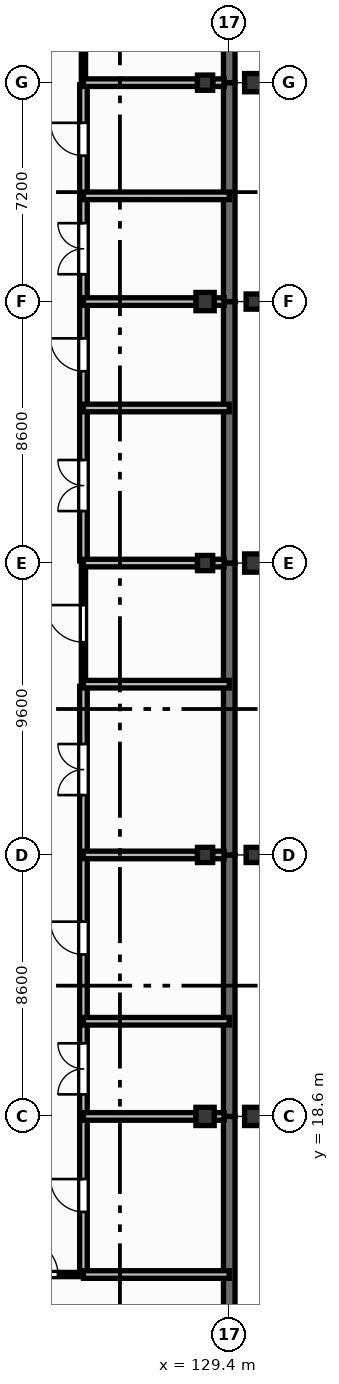
"""IFC4 building model, lengths in metres.
Left out: names, types, materials, properties, quantities, classifications, styles, units other than length and angle.
Written with IfcOpenShell. Run it as: python <this file> out.ifc"""

import sys

from ifc_helpers import new_model, si_unit, direction, frame, frame_2d, origin, origin_2d, place, context, subcontext, project, spatial, rectangle, extrude, element, fill, save


model = new_model("IFC4")
c1 = context("Model", 3, precision=1e-05, world=origin(), true_north=direction((0.0, 1.0)))
c2 = subcontext(c1, "Body", "Model", "MODEL_VIEW")
j1 = project(units=[si_unit("LENGTHUNIT", "METRE"), si_unit("PLANEANGLEUNIT", "RADIAN")], contexts=[c1])
p1 = place(None, origin())
s1 = spatial("IfcSite", under=j1, at=p1, CompositionType="ELEMENT")
p2 = place(p1, origin())
s2 = spatial("IfcBuilding", under=s1, at=p2, CompositionType="ELEMENT")
p3 = place(p2, origin())
s3 = spatial("IfcBuildingStorey", under=s2, at=p3, CompositionType="ELEMENT", Elevation=0.0)
p4 = place(p3, frame((128.6, 18.6, 0.0), z_axis=(0.0, 0.0, 1.0), x_axis=(1.0, 0.0, 0.0)))
e1 = element("IfcColumn", 1, at=p4, inside=s3, PredefinedType="COLUMN", context=c2, shape_type="SweptSolid", body=[
    extrude(rectangle(XDim=0.6, YDim=0.6, at=origin_2d()), origin(), (0.0, 0.0, 1.0), 4.2),
])
for number, where, z_axis, x_axis in (
    (2, (128.6, 27.2, 0.0), (0.0, 0.0, 1.0), (1.0, 0.0, 0.0)),
    (3, (128.6, 36.8, 0.0), (0.0, 0.0, 1.0), (1.0, 0.0, 0.0)),
):
    element("IfcColumn", number, at=place(p3, frame(where, z_axis=z_axis, x_axis=x_axis)), inside=s3, PredefinedType="COLUMN", context=c2, shape_type="SweptSolid", body=[
        extrude(rectangle(XDim=0.5, YDim=0.5, at=origin_2d()), origin(), (0.0, 0.0, 1.0), 4.2),
    ])
p5 = place(p3, frame((128.6, 45.4, 0.0), z_axis=(0.0, 0.0, 1.0), x_axis=(1.0, 0.0, 0.0)))
e4 = element("IfcColumn", 4, at=p5, inside=s3, PredefinedType="COLUMN", context=c2, shape_type="SweptSolid", body=[
    extrude(rectangle(XDim=0.6, YDim=0.6, at=origin_2d()), origin(), (0.0, 0.0, 1.0), 4.2),
])
p6 = place(p3, frame((128.6, 52.6, 0.0), z_axis=(0.0, 0.0, 1.0), x_axis=(1.0, 0.0, 0.0)))
e5 = element("IfcColumn", 5, at=p6, inside=s3, PredefinedType="COLUMN", context=c2, shape_type="SweptSolid", body=[
    extrude(rectangle(XDim=0.5, YDim=0.5, at=origin_2d()), origin(), (0.0, 0.0, 1.0), 4.2),
])
p7 = place(p3, frame((130.2, 18.6, -0.4), z_axis=(0.0, 0.0, 1.0), x_axis=(1.0, 0.0, 0.0)))
e6 = element("IfcColumn", 6, at=p7, inside=s3, PredefinedType="COLUMN", context=c2, shape_type="SweptSolid", body=[
    extrude(rectangle(XDim=0.6, YDim=0.6, at=origin_2d()), origin(), (0.0, 0.0, 1.0), 4.5),
])
p8 = place(p3, frame((130.2, 27.2, -0.4), z_axis=(0.0, 0.0, 1.0), x_axis=(1.0, 0.0, 0.0)))
e7 = element("IfcColumn", 7, at=p8, inside=s3, PredefinedType="COLUMN", context=c2, shape_type="SweptSolid", body=[
    extrude(rectangle(XDim=0.5, YDim=0.5, at=origin_2d()), origin(), (0.0, 0.0, 1.0), 4.5),
])
p9 = place(p3, frame((130.2, 36.8, -0.4), z_axis=(0.0, 0.0, 1.0), x_axis=(1.0, 0.0, 0.0)))
e8 = element("IfcColumn", 8, at=p9, inside=s3, PredefinedType="COLUMN", context=c2, shape_type="SweptSolid", body=[
    extrude(rectangle(XDim=0.6, YDim=0.6, at=origin_2d()), origin(), (0.0, 0.0, 1.0), 4.5),
])
p10 = place(p3, frame((130.2, 45.4, -0.4), z_axis=(0.0, 0.0, 1.0), x_axis=(1.0, 0.0, 0.0)))
e9 = element("IfcColumn", 9, at=p10, inside=s3, PredefinedType="COLUMN", context=c2, shape_type="SweptSolid", body=[
    extrude(rectangle(XDim=0.5, YDim=0.5, at=origin_2d()), origin(), (0.0, 0.0, 1.0), 4.5),
])
p11 = place(p3, frame((130.2, 52.6, -0.4), z_axis=(0.0, 0.0, 1.0), x_axis=(1.0, 0.0, 0.0)))
e10 = element("IfcColumn", 10, at=p11, inside=s3, PredefinedType="COLUMN", context=c2, shape_type="SweptSolid", body=[
    extrude(rectangle(XDim=0.6, YDim=0.6, at=origin_2d()), origin(), (0.0, 0.0, 1.0), 4.5),
])
p12 = place(p3, frame((129.395, 11.4, 0.0), z_axis=(0.0, 0.0, 1.0), x_axis=(0.0, 1.0, 0.0)))
e11 = element("IfcWall", 11, at=p12, inside=s3, PredefinedType="USERDEFINED", context=c2, shape_type="SweptSolid", body=[
    extrude(rectangle(XDim=7.2, YDim=0.38, at=frame_2d((3.6, 0.0))), origin(), (0.0, 0.0, 1.0), 4.2),
])
p13 = place(p3, frame((129.395, 18.6, 0.0), z_axis=(0.0, 0.0, 1.0), x_axis=(0.0, 1.0, 0.0)))
e12 = element("IfcWall", 12, at=p13, inside=s3, PredefinedType="USERDEFINED", context=c2, shape_type="SweptSolid", body=[
    extrude(rectangle(XDim=8.6, YDim=0.38, at=frame_2d((4.3, 0.0))), origin(), (0.0, 0.0, 1.0), 4.2),
])
p14 = place(p3, frame((129.395, 27.2, 0.0), z_axis=(0.0, 0.0, 1.0), x_axis=(0.0, 1.0, 0.0)))
e13 = element("IfcWall", 13, at=p14, inside=s3, PredefinedType="USERDEFINED", context=c2, shape_type="SweptSolid", body=[
    extrude(rectangle(XDim=9.6, YDim=0.38, at=frame_2d((4.8, 0.0))), origin(), (0.0, 0.0, 1.0), 4.2),
])
p15 = place(p3, frame((129.395, 36.8, 0.0), z_axis=(0.0, 0.0, 1.0), x_axis=(0.0, 1.0, 0.0)))
e14 = element("IfcWall", 14, at=p15, inside=s3, PredefinedType="USERDEFINED", context=c2, shape_type="SweptSolid", body=[
    extrude(rectangle(XDim=8.6, YDim=0.38, at=frame_2d((4.3, 0.0))), origin(), (0.0, 0.0, 1.0), 4.2),
])
p16 = place(p3, frame((129.395, 45.4, 0.0), z_axis=(0.0, 0.0, 1.0), x_axis=(0.0, 1.0, 0.0)))
e15 = element("IfcWall", 15, at=p16, inside=s3, PredefinedType="USERDEFINED", context=c2, shape_type="SweptSolid", body=[
    extrude(rectangle(XDim=7.2, YDim=0.38, at=frame_2d((3.6, 0.0))), origin(), (0.0, 0.0, 1.0), 4.2),
])
p17 = place(p3, frame((129.395, 52.6, 0.0), z_axis=(0.0, 0.0, 1.0), x_axis=(0.0, 1.0, 0.0)))
e16 = element("IfcWall", 16, at=p17, inside=s3, PredefinedType="USERDEFINED", context=c2, shape_type="SweptSolid", body=[
    extrude(rectangle(XDim=7.2, YDim=0.38, at=frame_2d((3.6, 0.0))), origin(), (0.0, 0.0, 1.0), 4.2),
])
p18 = place(p3, frame((121.8, 13.4, 0.0), z_axis=(0.0, 0.0, 1.0), x_axis=(1.0, 0.0, 0.0)))
e17 = element("IfcWall", 17, at=p18, inside=s3, PredefinedType="PARTITIONING", context=c2, shape_type="SweptSolid", body=[
    extrude(rectangle(XDim=2.8, YDim=0.14, at=frame_2d((1.4, 0.0))), origin(), (0.0, 0.0, 1.0), 4.18),
])
p19 = place(p18, frame((0.84, 0.0, 0.0)))
e18 = element("IfcOpeningElement", 18, at=p19, cuts=e17, PredefinedType="OPENING", context=c2, shape_type="SweptSolid", body=[
    extrude(rectangle(XDim=1.12, YDim=2.15, at=frame_2d((0.56, 1.075))), frame((0.0, 0.08, 0.0), z_axis=(0.0, -1.0, 0.0), x_axis=(1.0, 0.0, 0.0)), (0.0, 0.0, 1.0), 0.16),
])
p20 = place(p3, frame((124.6, 13.47, 0.0), z_axis=(0.0, 0.0, 1.0), x_axis=(0.0, 1.0, 0.0)))
e19 = element("IfcWall", 19, at=p20, inside=s3, PredefinedType="SOLIDWALL", context=c2, shape_type="SweptSolid", body=[
    extrude(rectangle(XDim=5.06, YDim=0.25, at=frame_2d((2.53, 0.0))), origin(), (0.0, 0.0, 1.0), 4.18),
])
p21 = place(p20, frame((1.99, 0.0, 0.0)))
e20 = element("IfcOpeningElement", 20, at=p21, cuts=e19, PredefinedType="OPENING", context=c2, shape_type="SweptSolid", body=[
    extrude(rectangle(XDim=1.08, YDim=2.15, at=frame_2d((0.54, 1.075))), frame((0.0, 0.135, 0.0), z_axis=(0.0, -1.0, 0.0), x_axis=(1.0, 0.0, 0.0)), (0.0, 0.0, 1.0), 0.27),
])
p22 = place(p3, frame((124.6, 13.4, 0.0), z_axis=(0.0, 0.0, 1.0), x_axis=(1.0, 0.0, 0.0)))
e21 = element("IfcWall", 21, at=p22, inside=s3, PredefinedType="SOLIDWALL", context=c2, shape_type="SweptSolid", body=[
    extrude(rectangle(XDim=4.795, YDim=0.25, at=frame_2d((2.397, 0.0))), origin(), (0.0, 0.0, 1.0), 4.18),
])
p23 = place(p3, frame((124.6, 18.67, 0.0), z_axis=(0.0, 0.0, 1.0), x_axis=(0.0, 1.0, 0.0)))
e22 = element("IfcWall", 22, at=p23, inside=s3, PredefinedType="SOLIDWALL", context=c2, shape_type="SweptSolid", body=[
    extrude(rectangle(XDim=2.99, YDim=0.25, at=frame_2d((1.495, 0.0))), origin(), (0.0, 0.0, 1.0), 4.18),
])
p24 = place(p23, frame((0.655, 0.0, 0.0)))
e23 = element("IfcOpeningElement", 23, at=p24, cuts=e22, PredefinedType="OPENING", context=c2, shape_type="SweptSolid", body=[
    extrude(rectangle(XDim=1.68, YDim=2.3, at=frame_2d((0.84, 1.15))), frame((0.0, 0.135, 0.0), z_axis=(0.0, -1.0, 0.0), x_axis=(1.0, 0.0, 0.0)), (0.0, 0.0, 1.0), 0.27),
])
p25 = place(p3, frame((124.6, 18.6, 0.0), z_axis=(0.0, 0.0, 1.0), x_axis=(1.0, 0.0, 0.0)))
e24 = element("IfcWall", 24, at=p25, inside=s3, PredefinedType="SOLIDWALL", context=c2, shape_type="SweptSolid", body=[
    extrude(rectangle(XDim=3.7, YDim=0.25, at=frame_2d((1.85, 0.0))), origin(), (0.0, 0.0, 1.0), 3.25),
])
p26 = place(p3, frame((128.9, 18.6, 0.0), z_axis=(0.0, 0.0, 1.0), x_axis=(1.0, 0.0, 0.0)))
e25 = element("IfcWall", 25, at=p26, inside=s3, PredefinedType="SOLIDWALL", context=c2, shape_type="SweptSolid", body=[
    extrude(rectangle(XDim=0.325, YDim=0.25, at=frame_2d((0.163, 0.0))), origin(), (0.0, 0.0, 1.0), 4.18),
])
p27 = place(p3, frame((124.6, 21.8, 0.0), z_axis=(0.0, 0.0, 1.0), x_axis=(0.0, 1.0, 0.0)))
e26 = element("IfcWall", 26, at=p27, inside=s3, PredefinedType="SOLIDWALL", context=c2, shape_type="SweptSolid", body=[
    extrude(rectangle(XDim=5.33, YDim=0.25, at=frame_2d((2.665, 0.0))), origin(), (0.0, 0.0, 1.0), 4.18),
])
p28 = place(p27, frame((2.125, 0.0, 0.0)))
e27 = element("IfcOpeningElement", 27, at=p28, cuts=e26, PredefinedType="OPENING", context=c2, shape_type="SweptSolid", body=[
    extrude(rectangle(XDim=1.08, YDim=2.15, at=frame_2d((0.54, 1.075))), frame((0.0, 0.135, 0.0), z_axis=(0.0, -1.0, 0.0), x_axis=(1.0, 0.0, 0.0)), (0.0, 0.0, 1.0), 0.27),
])
p29 = place(p3, frame((124.6, 21.73, 0.0), z_axis=(0.0, 0.0, 1.0), x_axis=(1.0, 0.0, 0.0)))
e28 = element("IfcWall", 28, at=p29, inside=s3, PredefinedType="SOLIDWALL", context=c2, shape_type="SweptSolid", body=[
    extrude(rectangle(XDim=4.795, YDim=0.25, at=frame_2d((2.397, 0.0))), origin(), (0.0, 0.0, 1.0), 4.18),
])
p30 = place(p3, frame((124.6, 27.27, 0.0), z_axis=(0.0, 0.0, 1.0), x_axis=(0.0, 1.0, 0.0)))
e29 = element("IfcWall", 29, at=p30, inside=s3, PredefinedType="SOLIDWALL", context=c2, shape_type="SweptSolid", body=[
    extrude(rectangle(XDim=5.476, YDim=0.25, at=frame_2d((2.738, 0.0))), origin(), (0.0, 0.0, 1.0), 4.18),
])
p31 = place(p30, frame((1.898, 0.0, 0.0)))
e30 = element("IfcOpeningElement", 30, at=p31, cuts=e29, PredefinedType="OPENING", context=c2, shape_type="SweptSolid", body=[
    extrude(rectangle(XDim=1.68, YDim=2.3, at=frame_2d((0.84, 1.15))), frame((0.0, 0.135, 0.0), z_axis=(0.0, -1.0, 0.0), x_axis=(1.0, 0.0, 0.0)), (0.0, 0.0, 1.0), 0.27),
])
p32 = place(p3, frame((124.6, 27.2, 0.0), z_axis=(0.0, 0.0, 1.0), x_axis=(1.0, 0.0, 0.0)))
e31 = element("IfcWall", 31, at=p32, inside=s3, PredefinedType="SOLIDWALL", context=c2, shape_type="SweptSolid", body=[
    extrude(rectangle(XDim=3.75, YDim=0.25, at=frame_2d((1.875, 0.0))), origin(), (0.0, 0.0, 1.0), 3.6),
])
p33 = place(p3, frame((128.85, 27.2, 0.0), z_axis=(0.0, 0.0, 1.0), x_axis=(1.0, 0.0, 0.0)))
e32 = element("IfcWall", 32, at=p33, inside=s3, PredefinedType="SOLIDWALL", context=c2, shape_type="SweptSolid", body=[
    extrude(rectangle(XDim=0.375, YDim=0.25, at=frame_2d((0.188, 0.0))), origin(), (0.0, 0.0, 1.0), 4.18),
])
p34 = place(p3, frame((124.6, 32.886, 0.0), z_axis=(0.0, 0.0, 1.0), x_axis=(0.0, 1.0, 0.0)))
e33 = element("IfcWall", 33, at=p34, inside=s3, PredefinedType="PARTITIONING", context=c2, shape_type="SweptSolid", body=[
    extrude(rectangle(XDim=3.844, YDim=0.14, at=frame_2d((1.922, 0.0))), origin(), (0.0, 0.0, 1.0), 4.18),
])
p35 = place(p34, frame((1.312, 0.0, 0.0)))
e34 = element("IfcOpeningElement", 34, at=p35, cuts=e33, PredefinedType="OPENING", context=c2, shape_type="SweptSolid", body=[
    extrude(rectangle(XDim=1.22, YDim=2.1, at=frame_2d((0.61, 1.05))), frame((0.0, 0.08, 0.0), z_axis=(0.0, -1.0, 0.0), x_axis=(1.0, 0.0, 0.0)), (0.0, 0.0, 1.0), 0.16),
])
p36 = place(p3, frame((124.6, 32.816, 0.0), z_axis=(0.0, 0.0, 1.0), x_axis=(1.0, 0.0, 0.0)))
e35 = element("IfcWall", 35, at=p36, inside=s3, PredefinedType="SOLIDWALL", context=c2, shape_type="SweptSolid", body=[
    extrude(rectangle(XDim=4.795, YDim=0.25, at=frame_2d((2.397, 0.0))), origin(), (0.0, 0.0, 1.0), 4.18),
])
p37 = place(p3, frame((124.6, 36.87, 0.0), z_axis=(0.0, 0.0, 1.0), x_axis=(0.0, 1.0, 0.0)))
e36 = element("IfcWall", 36, at=p37, inside=s3, PredefinedType="SOLIDWALL", context=c2, shape_type="SweptSolid", body=[
    extrude(rectangle(XDim=4.96, YDim=0.25, at=frame_2d((2.48, 0.0))), origin(), (0.0, 0.0, 1.0), 4.18),
])
p38 = place(p37, frame((1.64, 0.0, 0.0)))
e37 = element("IfcOpeningElement", 37, at=p38, cuts=e36, PredefinedType="OPENING", context=c2, shape_type="SweptSolid", body=[
    extrude(rectangle(XDim=1.68, YDim=2.3, at=frame_2d((0.84, 1.15))), frame((0.0, 0.135, 0.0), z_axis=(0.0, -1.0, 0.0), x_axis=(1.0, 0.0, 0.0)), (0.0, 0.0, 1.0), 0.27),
])
p39 = place(p3, frame((124.6, 36.8, 0.0), z_axis=(0.0, 0.0, 1.0), x_axis=(1.0, 0.0, 0.0)))
e38 = element("IfcWall", 38, at=p39, inside=s3, PredefinedType="SOLIDWALL", context=c2, shape_type="SweptSolid", body=[
    extrude(rectangle(XDim=3.75, YDim=0.25, at=frame_2d((1.875, 0.0))), origin(), (0.0, 0.0, 1.0), 3.5),
])
p40 = place(p3, frame((128.85, 36.8, 0.0), z_axis=(0.0, 0.0, 1.0), x_axis=(1.0, 0.0, 0.0)))
e39 = element("IfcWall", 39, at=p40, inside=s3, PredefinedType="SOLIDWALL", context=c2, shape_type="SweptSolid", body=[
    extrude(rectangle(XDim=0.375, YDim=0.25, at=frame_2d((0.188, 0.0))), origin(), (0.0, 0.0, 1.0), 4.18),
])
p41 = place(p3, frame((124.6, 41.97, 0.0), z_axis=(0.0, 0.0, 1.0), x_axis=(0.0, 1.0, 0.0)))
e40 = element("IfcWall", 40, at=p41, inside=s3, PredefinedType="SOLIDWALL", context=c2, shape_type="SweptSolid", body=[
    extrude(rectangle(XDim=3.36, YDim=0.25, at=frame_2d((1.68, 0.0))), origin(), (0.0, 0.0, 1.0), 4.18),
])
p42 = place(p41, frame((1.14, 0.0, 0.0)))
e41 = element("IfcOpeningElement", 41, at=p42, cuts=e40, PredefinedType="OPENING", context=c2, shape_type="SweptSolid", body=[
    extrude(rectangle(XDim=1.08, YDim=2.15, at=frame_2d((0.54, 1.075))), frame((0.0, 0.135, 0.0), z_axis=(0.0, -1.0, 0.0), x_axis=(1.0, 0.0, 0.0)), (0.0, 0.0, 1.0), 0.27),
])
p43 = place(p3, frame((124.6, 41.9, 0.0), z_axis=(0.0, 0.0, 1.0), x_axis=(1.0, 0.0, 0.0)))
e42 = element("IfcWall", 42, at=p43, inside=s3, PredefinedType="SOLIDWALL", context=c2, shape_type="SweptSolid", body=[
    extrude(rectangle(XDim=4.795, YDim=0.25, at=frame_2d((2.397, 0.0))), origin(), (0.0, 0.0, 1.0), 4.18),
])
p44 = place(p3, frame((124.6, 45.47, 0.0), z_axis=(0.0, 0.0, 1.0), x_axis=(0.0, 1.0, 0.0)))
e43 = element("IfcWall", 43, at=p44, inside=s3, PredefinedType="SOLIDWALL", context=c2, shape_type="SweptSolid", body=[
    extrude(rectangle(XDim=3.338, YDim=0.25, at=frame_2d((1.669, 0.0))), origin(), (0.0, 0.0, 1.0), 4.18),
])
p45 = place(p44, frame((0.829, 0.0, 0.0)))
e44 = element("IfcOpeningElement", 44, at=p45, cuts=e43, PredefinedType="OPENING", context=c2, shape_type="SweptSolid", body=[
    extrude(rectangle(XDim=1.68, YDim=2.3, at=frame_2d((0.84, 1.15))), frame((0.0, 0.135, 0.0), z_axis=(0.0, -1.0, 0.0), x_axis=(1.0, 0.0, 0.0)), (0.0, 0.0, 1.0), 0.27),
])
p46 = place(p3, frame((124.6, 45.4, 0.0), z_axis=(0.0, 0.0, 1.0), x_axis=(1.0, 0.0, 0.0)))
e45 = element("IfcWall", 45, at=p46, inside=s3, PredefinedType="SOLIDWALL", context=c2, shape_type="SweptSolid", body=[
    extrude(rectangle(XDim=3.7, YDim=0.25, at=frame_2d((1.85, 0.0))), origin(), (0.0, 0.0, 1.0), 3.25),
])
p47 = place(p3, frame((128.9, 45.4, 0.0), z_axis=(0.0, 0.0, 1.0), x_axis=(1.0, 0.0, 0.0)))
e46 = element("IfcWall", 46, at=p47, inside=s3, PredefinedType="SOLIDWALL", context=c2, shape_type="SweptSolid", body=[
    extrude(rectangle(XDim=0.325, YDim=0.25, at=frame_2d((0.163, 0.0))), origin(), (0.0, 0.0, 1.0), 4.18),
])
p48 = place(p3, frame((124.6, 48.948, 0.0), z_axis=(0.0, 0.0, 1.0), x_axis=(0.0, 1.0, 0.0)))
e47 = element("IfcWall", 47, at=p48, inside=s3, PredefinedType="SOLIDWALL", context=c2, shape_type="SweptSolid", body=[
    extrude(rectangle(XDim=3.582, YDim=0.25, at=frame_2d((1.791, 0.0))), origin(), (0.0, 0.0, 1.0), 4.18),
])
p49 = place(p48, frame((1.251, 0.0, 0.0)))
e48 = element("IfcOpeningElement", 48, at=p49, cuts=e47, PredefinedType="OPENING", context=c2, shape_type="SweptSolid", body=[
    extrude(rectangle(XDim=1.08, YDim=2.15, at=frame_2d((0.54, 1.075))), frame((0.0, 0.135, 0.0), z_axis=(0.0, -1.0, 0.0), x_axis=(1.0, 0.0, 0.0)), (0.0, 0.0, 1.0), 0.27),
])
p50 = place(p3, frame((124.6, 48.878, 0.0), z_axis=(0.0, 0.0, 1.0), x_axis=(1.0, 0.0, 0.0)))
e49 = element("IfcWall", 49, at=p50, inside=s3, PredefinedType="SOLIDWALL", context=c2, shape_type="SweptSolid", body=[
    extrude(rectangle(XDim=4.795, YDim=0.25, at=frame_2d((2.397, 0.0))), origin(), (0.0, 0.0, 1.0), 4.18),
])
p51 = place(p3, frame((124.6, 52.67, 0.0), z_axis=(0.0, 0.0, 1.0), x_axis=(0.0, 1.0, 0.0)))
e50 = element("IfcWall", 50, at=p51, inside=s3, PredefinedType="PARTITIONING", context=c2, shape_type="SweptSolid", body=[
    extrude(rectangle(XDim=3.26, YDim=0.14, at=frame_2d((1.63, 0.0))), origin(), (0.0, 0.0, 1.0), 4.18),
])
p52 = place(p51, frame((1.02, 0.0, 0.0)))
e51 = element("IfcOpeningElement", 51, at=p52, cuts=e50, PredefinedType="OPENING", context=c2, shape_type="SweptSolid", body=[
    extrude(rectangle(XDim=1.22, YDim=2.1, at=frame_2d((0.61, 1.05))), frame((0.0, 0.08, 0.0), z_axis=(0.0, -1.0, 0.0), x_axis=(1.0, 0.0, 0.0)), (0.0, 0.0, 1.0), 0.16),
])
p53 = place(p3, frame((124.6, 52.6, 0.0), z_axis=(0.0, 0.0, 1.0), x_axis=(1.0, 0.0, 0.0)))
e52 = element("IfcWall", 52, at=p53, inside=s3, PredefinedType="SOLIDWALL", context=c2, shape_type="SweptSolid", body=[
    extrude(rectangle(XDim=3.75, YDim=0.25, at=frame_2d((1.875, 0.0))), origin(), (0.0, 0.0, 1.0), 3.5),
])
p54 = place(p3, frame((128.85, 52.6, 0.0), z_axis=(0.0, 0.0, 1.0), x_axis=(1.0, 0.0, 0.0)))
e53 = element("IfcWall", 53, at=p54, inside=s3, PredefinedType="SOLIDWALL", context=c2, shape_type="SweptSolid", body=[
    extrude(rectangle(XDim=0.375, YDim=0.25, at=frame_2d((0.188, 0.0))), origin(), (0.0, 0.0, 1.0), 4.18),
])
p55 = place(p19, origin())
e54 = element("IfcDoor", 54, at=p55, inside=s3, OperationType="SINGLE_SWING_LEFT", PredefinedType="DOOR", context=c2, shape_type="SweptSolid", body=[
    extrude(rectangle(XDim=1.12, YDim=2.15, at=frame_2d((0.56, 1.075))), frame((0.0, 0.025, 0.0), z_axis=(0.0, -1.0, 0.0), x_axis=(1.0, 0.0, 0.0)), (0.0, 0.0, 1.0), 0.05),
])
fill(e18, e54)
p56 = place(p21, origin())
e55 = element("IfcDoor", 55, at=p56, inside=s3, OperationType="SINGLE_SWING_RIGHT", PredefinedType="DOOR", context=c2, shape_type="SweptSolid", body=[
    extrude(rectangle(XDim=1.08, YDim=2.15, at=frame_2d((0.54, 1.075))), frame((0.0, 0.025, 0.0), z_axis=(0.0, -1.0, 0.0), x_axis=(1.0, 0.0, 0.0)), (0.0, 0.0, 1.0), 0.05),
])
fill(e20, e55)
p57 = place(p24, origin())
e56 = element("IfcDoor", 56, at=p57, inside=s3, OperationType="DOUBLE_DOOR_SINGLE_SWING", PredefinedType="DOOR", context=c2, shape_type="SweptSolid", body=[
    extrude(rectangle(XDim=1.68, YDim=2.3, at=frame_2d((0.84, 1.15))), frame((0.0, 0.025, 0.0), z_axis=(0.0, -1.0, 0.0), x_axis=(1.0, 0.0, 0.0)), (0.0, 0.0, 1.0), 0.05),
])
fill(e23, e56)
p58 = place(p28, origin())
e57 = element("IfcDoor", 57, at=p58, inside=s3, OperationType="SINGLE_SWING_RIGHT", PredefinedType="DOOR", context=c2, shape_type="SweptSolid", body=[
    extrude(rectangle(XDim=1.08, YDim=2.15, at=frame_2d((0.54, 1.075))), frame((0.0, 0.025, 0.0), z_axis=(0.0, -1.0, 0.0), x_axis=(1.0, 0.0, 0.0)), (0.0, 0.0, 1.0), 0.05),
])
fill(e27, e57)
p59 = place(p31, origin())
e58 = element("IfcDoor", 58, at=p59, inside=s3, OperationType="DOUBLE_DOOR_SINGLE_SWING", PredefinedType="DOOR", context=c2, shape_type="SweptSolid", body=[
    extrude(rectangle(XDim=1.68, YDim=2.3, at=frame_2d((0.84, 1.15))), frame((0.0, 0.025, 0.0), z_axis=(0.0, -1.0, 0.0), x_axis=(1.0, 0.0, 0.0)), (0.0, 0.0, 1.0), 0.05),
])
fill(e30, e58)
p60 = place(p35, origin())
e59 = element("IfcDoor", 59, at=p60, inside=s3, OperationType="SINGLE_SWING_RIGHT", PredefinedType="DOOR", context=c2, shape_type="SweptSolid", body=[
    extrude(rectangle(XDim=1.22, YDim=2.1, at=frame_2d((0.61, 1.05))), frame((0.0, 0.025, 0.0), z_axis=(0.0, -1.0, 0.0), x_axis=(1.0, 0.0, 0.0)), (0.0, 0.0, 1.0), 0.05),
])
fill(e34, e59)
p61 = place(p38, origin())
e60 = element("IfcDoor", 60, at=p61, inside=s3, OperationType="DOUBLE_DOOR_SINGLE_SWING", PredefinedType="DOOR", context=c2, shape_type="SweptSolid", body=[
    extrude(rectangle(XDim=1.68, YDim=2.3, at=frame_2d((0.84, 1.15))), frame((0.0, 0.025, 0.0), z_axis=(0.0, -1.0, 0.0), x_axis=(1.0, 0.0, 0.0)), (0.0, 0.0, 1.0), 0.05),
])
fill(e37, e60)
p62 = place(p42, origin())
e61 = element("IfcDoor", 61, at=p62, inside=s3, OperationType="SINGLE_SWING_RIGHT", PredefinedType="DOOR", context=c2, shape_type="SweptSolid", body=[
    extrude(rectangle(XDim=1.08, YDim=2.15, at=frame_2d((0.54, 1.075))), frame((0.0, 0.025, 0.0), z_axis=(0.0, -1.0, 0.0), x_axis=(1.0, 0.0, 0.0)), (0.0, 0.0, 1.0), 0.05),
])
fill(e41, e61)
p63 = place(p45, origin())
e62 = element("IfcDoor", 62, at=p63, inside=s3, OperationType="DOUBLE_DOOR_SINGLE_SWING", PredefinedType="DOOR", context=c2, shape_type="SweptSolid", body=[
    extrude(rectangle(XDim=1.68, YDim=2.3, at=frame_2d((0.84, 1.15))), frame((0.0, 0.025, 0.0), z_axis=(0.0, -1.0, 0.0), x_axis=(1.0, 0.0, 0.0)), (0.0, 0.0, 1.0), 0.05),
])
fill(e44, e62)
p64 = place(p49, origin())
e63 = element("IfcDoor", 63, at=p64, inside=s3, OperationType="SINGLE_SWING_RIGHT", PredefinedType="DOOR", context=c2, shape_type="SweptSolid", body=[
    extrude(rectangle(XDim=1.08, YDim=2.15, at=frame_2d((0.54, 1.075))), frame((0.0, 0.025, 0.0), z_axis=(0.0, -1.0, 0.0), x_axis=(1.0, 0.0, 0.0)), (0.0, 0.0, 1.0), 0.05),
])
fill(e48, e63)
save(model, sys.argv[1])
